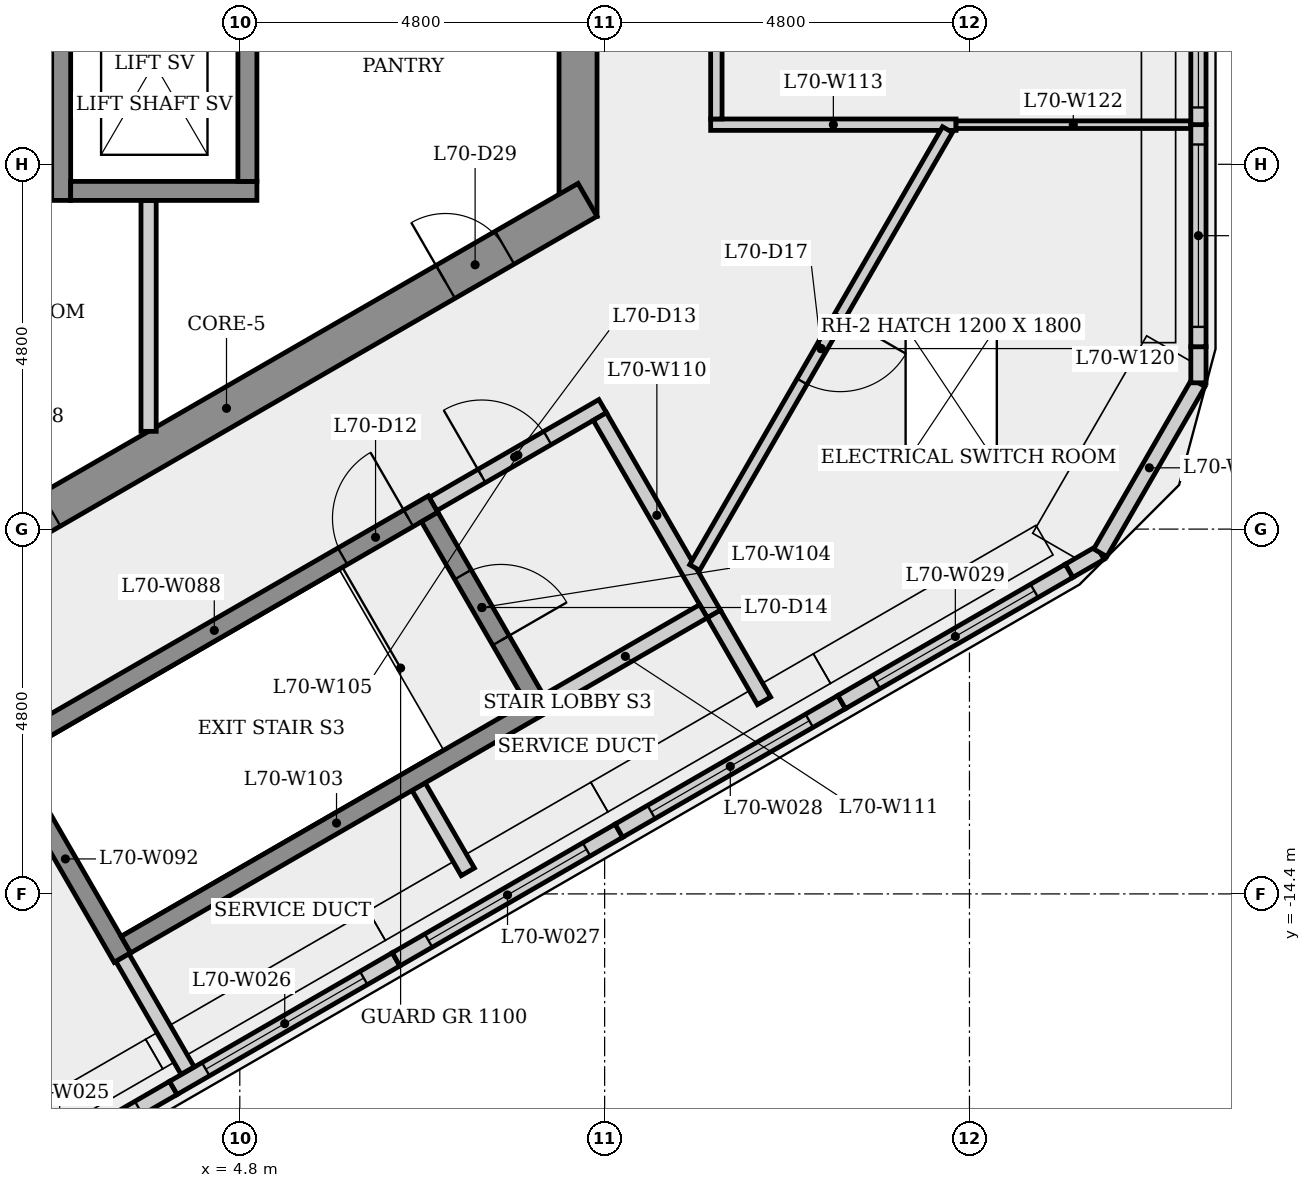
"""IFC4 building model, lengths in metres.
Left out: names, types, materials, properties, quantities, classifications, styles, units other than length and angle.
Written with IfcOpenShell. Run it as: python <this file> out.ifc"""

import sys

from ifc_helpers import new_model, si_unit, direction, frame, frame_2d, origin, origin_2d, place, context, subcontext, project, spatial, rectangle, extrude, element, fill, save


model = new_model("IFC4")
c1 = context("Model", 3, precision=1e-05, world=origin(), true_north=direction((0.0, 1.0)))
c2 = subcontext(c1, "Body", "Model", "MODEL_VIEW")
j1 = project(units=[si_unit("LENGTHUNIT", "METRE"), si_unit("PLANEANGLEUNIT", "RADIAN")], contexts=[c1])
p1 = place(None, origin())
s1 = spatial("IfcSite", under=j1, at=p1, CompositionType="ELEMENT")
p2 = place(p1, origin())
s2 = spatial("IfcBuilding", under=s1, at=p2, CompositionType="ELEMENT")
p3 = place(p2, frame((0.0, 0.0, 262.9)))
s3 = spatial("IfcBuildingStorey", under=s2, at=p3, CompositionType="ELEMENT", Elevation=262.9)
p4 = place(p3, frame((9.25, -5.485, 0.0), z_axis=(0.0, 0.0, 1.0), x_axis=(0.0, 1.0, 0.0)))
e1 = element("IfcWall", 1, at=p4, inside=s3, PredefinedType="SHEAR", context=c2, shape_type="SweptSolid", body=[
    extrude(rectangle(XDim=10.97, YDim=0.5, at=frame_2d((5.485, 0.0))), origin(), (0.0, 0.0, 1.0), 4.8),
])
p5 = place(p4, frame((4.685, 0.0, 0.0)))
e2 = element("IfcOpeningElement", 2, at=p5, cuts=e1, PredefinedType="OPENING", context=c2, shape_type="SweptSolid", body=[
    extrude(rectangle(XDim=1.6, YDim=2.1, at=frame_2d((0.8, 1.05))), frame((0.0, 0.26, 0.0), z_axis=(0.0, -1.0, 0.0), x_axis=(1.0, 0.0, 0.0)), (0.0, 0.0, 1.0), 0.52),
])
p6 = place(p3, frame((-0.125, -10.753, 0.0), z_axis=(0.0, 0.0, 1.0), x_axis=(0.866023993627, 0.500002442456, 0.0)))
e3 = element("IfcWall", 3, at=p6, inside=s3, PredefinedType="SHEAR", context=c2, shape_type="SweptSolid", body=[
    extrude(rectangle(XDim=10.97, YDim=0.5, at=frame_2d((5.485, 0.0))), origin(), (0.0, 0.0, 1.0), 4.8),
])
p7 = place(p6, frame((1.918, 0.0, 0.0)))
e4 = element("IfcOpeningElement", 4, at=p7, cuts=e3, PredefinedType="OPENING", context=c2, shape_type="SweptSolid", body=[
    extrude(rectangle(XDim=0.9, YDim=2.1, at=frame_2d((0.45, 1.05))), frame((0.0, 0.26, 0.0), z_axis=(0.0, -1.0, 0.0), x_axis=(1.0, 0.0, 0.0)), (0.0, 0.0, 1.0), 0.52),
])
p8 = place(p6, frame((8.812, 0.0, 0.0)))
e5 = element("IfcOpeningElement", 5, at=p8, cuts=e3, PredefinedType="OPENING", context=c2, shape_type="SweptSolid", body=[
    extrude(rectangle(XDim=0.9, YDim=2.1, at=frame_2d((0.45, 1.05))), frame((0.0, 0.26, 0.0), z_axis=(0.0, -1.0, 0.0), x_axis=(1.0, 0.0, 0.0)), (0.0, 0.0, 1.0), 0.52),
])
p9 = place(p3, frame((0.935, -18.68, 0.0), z_axis=(0.0, 0.0, 1.0), x_axis=(0.866046690806, 0.499963127985, 0.0)))
e6 = element("IfcWall", 6, at=p9, inside=s3, PredefinedType="SOLIDWALL", context=c2, shape_type="SweptSolid", body=[
    extrude(rectangle(XDim=3.454, YDim=0.2, at=frame_2d((1.727, 0.0))), origin(), (0.0, 0.0, 1.0), 4.8),
])
p10 = place(p9, frame((0.527, 0.0, 0.8)))
e7 = element("IfcOpeningElement", 7, at=p10, cuts=e6, PredefinedType="OPENING", context=c2, shape_type="SweptSolid", body=[
    extrude(rectangle(XDim=2.4, YDim=2.4, at=frame_2d((1.2, 1.2))), frame((0.0, 0.11, 0.0), z_axis=(0.0, -1.0, 0.0), x_axis=(1.0, 0.0, 0.0)), (0.0, 0.0, 1.0), 0.22),
])
p11 = place(p3, frame((3.926, -16.953, 0.0), z_axis=(0.0, 0.0, 1.0), x_axis=(0.866010178455, 0.500026370116, 0.0)))
e8 = element("IfcWall", 8, at=p11, inside=s3, PredefinedType="SOLIDWALL", context=c2, shape_type="SweptSolid", body=[
    extrude(rectangle(XDim=3.384, YDim=0.2, at=frame_2d((1.692, 0.0))), origin(), (0.0, 0.0, 1.0), 4.8),
])
p12 = place(p11, frame((0.492, 0.0, 0.8)))
e9 = element("IfcOpeningElement", 9, at=p12, cuts=e8, PredefinedType="OPENING", context=c2, shape_type="SweptSolid", body=[
    extrude(rectangle(XDim=2.4, YDim=2.4, at=frame_2d((1.2, 1.2))), frame((0.0, 0.11, 0.0), z_axis=(0.0, -1.0, 0.0), x_axis=(1.0, 0.0, 0.0)), (0.0, 0.0, 1.0), 0.22),
])
p13 = place(p3, frame((6.856, -15.261, 0.0), z_axis=(0.0, 0.0, 1.0), x_axis=(0.866051074803, 0.499955533855, 0.0)))
e10 = element("IfcWall", 10, at=p13, inside=s3, PredefinedType="SOLIDWALL", context=c2, shape_type="SweptSolid", body=[
    extrude(rectangle(XDim=3.385, YDim=0.2, at=frame_2d((1.692, 0.0))), origin(), (0.0, 0.0, 1.0), 4.8),
])
p14 = place(p13, frame((0.492, 0.0, 0.8)))
e11 = element("IfcOpeningElement", 11, at=p14, cuts=e10, PredefinedType="OPENING", context=c2, shape_type="SweptSolid", body=[
    extrude(rectangle(XDim=2.4, YDim=2.4, at=frame_2d((1.2, 1.2))), frame((0.0, 0.11, 0.0), z_axis=(0.0, -1.0, 0.0), x_axis=(1.0, 0.0, 0.0)), (0.0, 0.0, 1.0), 0.22),
])
p15 = place(p3, frame((9.788, -13.568, 0.0), z_axis=(0.0, 0.0, 1.0), x_axis=(0.865992138996, 0.500057611879, 0.0)))
e12 = element("IfcWall", 12, at=p15, inside=s3, PredefinedType="SOLIDWALL", context=c2, shape_type="SweptSolid", body=[
    extrude(rectangle(XDim=3.384, YDim=0.2, at=frame_2d((1.692, 0.0))), origin(), (0.0, 0.0, 1.0), 4.8),
])
p16 = place(p15, frame((0.492, 0.0, 0.8)))
e13 = element("IfcOpeningElement", 13, at=p16, cuts=e12, PredefinedType="OPENING", context=c2, shape_type="SweptSolid", body=[
    extrude(rectangle(XDim=2.4, YDim=2.4, at=frame_2d((1.2, 1.2))), frame((0.0, 0.11, 0.0), z_axis=(0.0, -1.0, 0.0), x_axis=(1.0, 0.0, 0.0)), (0.0, 0.0, 1.0), 0.22),
])
p17 = place(p3, frame((12.719, -11.876, 0.0), z_axis=(0.0, 0.0, 1.0), x_axis=(0.866064358114, 0.499932523051, 0.0)))
e14 = element("IfcWall", 14, at=p17, inside=s3, PredefinedType="SOLIDWALL", context=c2, shape_type="SweptSolid", body=[
    extrude(rectangle(XDim=3.454, YDim=0.2, at=frame_2d((1.727, 0.0))), origin(), (0.0, 0.0, 1.0), 4.8),
])
p18 = place(p17, frame((0.527, 0.0, 0.8)))
e15 = element("IfcOpeningElement", 15, at=p18, cuts=e14, PredefinedType="OPENING", context=c2, shape_type="SweptSolid", body=[
    extrude(rectangle(XDim=2.4, YDim=2.4, at=frame_2d((1.2, 1.2))), frame((0.0, 0.11, 0.0), z_axis=(0.0, -1.0, 0.0), x_axis=(1.0, 0.0, 0.0)), (0.0, 0.0, 1.0), 0.22),
])
p19 = place(p3, frame((15.71, -10.149, 0.0), z_axis=(0.0, 0.0, 1.0), x_axis=(0.865860123781, 0.500286164156, 0.0)))
e16 = element("IfcWall", 16, at=p19, inside=s3, PredefinedType="SOLIDWALL", context=c2, shape_type="SweptSolid", body=[
    extrude(rectangle(XDim=0.475, YDim=0.2, at=frame_2d((0.237, 0.0))), origin(), (0.0, 0.0, 1.0), 4.8),
])
p20 = place(p3, frame((16.121, -9.912, 0.0), z_axis=(0.0, 0.0, 1.0), x_axis=(0.500063394028, 0.865988800131, 0.0)))
e17 = element("IfcWall", 17, at=p20, inside=s3, PredefinedType="SOLIDWALL", context=c2, shape_type="SweptSolid", body=[
    extrude(rectangle(XDim=2.583, YDim=0.2, at=frame_2d((1.292, 0.0))), origin(), (0.0, 0.0, 1.0), 4.8),
])
p21 = place(p3, frame((17.413, -7.675, 0.0), z_axis=(0.0, 0.0, 1.0), x_axis=(0.0, 1.0, 0.0)))
e18 = element("IfcWall", 18, at=p21, inside=s3, PredefinedType="SOLIDWALL", context=c2, shape_type="SweptSolid", body=[
    extrude(rectangle(XDim=0.475, YDim=0.2, at=frame_2d((0.238, 0.0))), origin(), (0.0, 0.0, 1.0), 4.8),
])
p22 = place(p3, frame((17.413, -7.2, 0.0), z_axis=(0.0, 0.0, 1.0), x_axis=(0.0, 1.0, 0.0)))
e19 = element("IfcWall", 19, at=p22, inside=s3, PredefinedType="SOLIDWALL", context=c2, shape_type="SweptSolid", body=[
    extrude(rectangle(XDim=2.922, YDim=0.2, at=frame_2d((1.461, 0.0))), origin(), (0.0, 0.0, 1.0), 4.8),
])
p23 = place(p22, frame((0.261, 0.0, 0.8)))
e20 = element("IfcOpeningElement", 20, at=p23, cuts=e19, PredefinedType="OPENING", context=c2, shape_type="SweptSolid", body=[
    extrude(rectangle(XDim=2.4, YDim=2.4, at=frame_2d((1.2, 1.2))), frame((0.0, 0.11, 0.0), z_axis=(0.0, -1.0, 0.0), x_axis=(1.0, 0.0, 0.0)), (0.0, 0.0, 1.0), 0.22),
])
p24 = place(p3, frame((17.413, -4.278, 0.0), z_axis=(0.0, 0.0, 1.0), x_axis=(0.0, 1.0, 0.0)))
e21 = element("IfcWall", 21, at=p24, inside=s3, PredefinedType="SOLIDWALL", context=c2, shape_type="SweptSolid", body=[
    extrude(rectangle(XDim=2.852, YDim=0.2, at=frame_2d((1.426, 0.0))), origin(), (0.0, 0.0, 1.0), 4.8),
])
p25 = place(p24, frame((0.226, 0.0, 0.8)))
e22 = element("IfcOpeningElement", 22, at=p25, cuts=e21, PredefinedType="OPENING", context=c2, shape_type="SweptSolid", body=[
    extrude(rectangle(XDim=2.4, YDim=2.4, at=frame_2d((1.2, 1.2))), frame((0.0, 0.11, 0.0), z_axis=(0.0, -1.0, 0.0), x_axis=(1.0, 0.0, 0.0)), (0.0, 0.0, 1.0), 0.22),
])
p26 = place(p3, frame((1.585, -12.595, 0.0), z_axis=(0.0, 0.0, 1.0), x_axis=(0.866036417653, 0.499980922934, 0.0)))
e23 = element("IfcWall", 23, at=p26, inside=s3, PredefinedType="SHEAR", context=c2, shape_type="SweptSolid", body=[
    extrude(rectangle(XDim=6.65, YDim=0.25, at=frame_2d((3.325, 0.0))), origin(), (0.0, 0.0, 1.0), 4.5),
])
p27 = place(p26, frame((5.275, 0.0, 0.0)))
e24 = element("IfcOpeningElement", 24, at=p27, cuts=e23, PredefinedType="OPENING", context=c2, shape_type="SweptSolid", body=[
    extrude(rectangle(XDim=1.0, YDim=2.1, at=frame_2d((0.5, 1.05))), frame((0.0, 0.135, 0.0), z_axis=(0.0, -1.0, 0.0), x_axis=(1.0, 0.0, 0.0)), (0.0, 0.0, 1.0), 0.27),
])
p28 = place(p3, frame((2.45, -5.275, 0.0), z_axis=(0.0, 0.0, 1.0), x_axis=(0.0, 1.0, 0.0)))
e25 = element("IfcWall", 25, at=p28, inside=s3, PredefinedType="SHEAR", context=c2, shape_type="SweptSolid", body=[
    extrude(rectangle(XDim=3.6, YDim=0.25, at=frame_2d((1.8, 0.0))), origin(), (0.0, 0.0, 1.0), 4.5),
])
p29 = place(p3, frame((3.256, -15.239, 0.0), z_axis=(0.0, 0.0, 1.0), x_axis=(-0.50002537861, 0.866010750942, 0.0)))
e26 = element("IfcWall", 26, at=p29, inside=s3, PredefinedType="SHEAR", context=c2, shape_type="SweptSolid", body=[
    extrude(rectangle(XDim=3.0, YDim=0.25, at=frame_2d((1.5, 0.0))), origin(), (0.0, 0.0, 1.0), 4.5),
])
p30 = place(p3, frame((3.6, -5.275, 0.0), z_axis=(0.0, 0.0, 1.0), x_axis=(0.0, -1.0, 0.0)))
e27 = element("IfcWall", 27, at=p30, inside=s3, PredefinedType="PARTITIONING", context=c2, shape_type="SweptSolid", body=[
    extrude(rectangle(XDim=3.039, YDim=0.2, at=frame_2d((1.52, 0.0))), origin(), (0.0, 0.0, 1.0), 4.5),
])
p31 = place(p3, frame((2.575, -5.15, 0.0), z_axis=(0.0, 0.0, 1.0), x_axis=(1.0, 0.0, 0.0)))
e28 = element("IfcWall", 28, at=p31, inside=s3, PredefinedType="SHEAR", context=c2, shape_type="SweptSolid", body=[
    extrude(rectangle(XDim=2.45, YDim=0.25, at=frame_2d((1.225, 0.0))), origin(), (0.0, 0.0, 1.0), 4.5),
])
p32 = place(p3, frame((4.113, -16.725, 0.0), z_axis=(0.0, 0.0, 1.0), x_axis=(-0.499919551962, 0.866071845499, 0.0)))
e29 = element("IfcWall", 29, at=p32, inside=s3, PredefinedType="PLUMBINGWALL", context=c2, shape_type="SweptSolid", body=[
    extrude(rectangle(XDim=1.716, YDim=0.2, at=frame_2d((0.858, 0.0))), origin(), (0.0, 0.0, 1.0), 4.5),
])
p33 = place(p3, frame((4.9, -1.675, 0.0), z_axis=(0.0, 0.0, 1.0), x_axis=(0.0, -1.0, 0.0)))
e30 = element("IfcWall", 30, at=p33, inside=s3, PredefinedType="SHEAR", context=c2, shape_type="SweptSolid", body=[
    extrude(rectangle(XDim=3.35, YDim=0.25, at=frame_2d((1.675, 0.0))), origin(), (0.0, 0.0, 1.0), 4.5),
])
p34 = place(p3, frame((7.153, -12.989, 0.0), z_axis=(0.0, 0.0, 1.0), x_axis=(0.499972779981, -0.866041118699, 0.0)))
e31 = element("IfcWall", 31, at=p34, inside=s3, PredefinedType="PLUMBINGWALL", context=c2, shape_type="SweptSolid", body=[
    extrude(rectangle(XDim=1.294, YDim=0.2, at=frame_2d((0.647, 0.0))), origin(), (0.0, 0.0, 1.0), 4.5),
])
p35 = place(p3, frame((3.301, -15.068, 0.0), z_axis=(0.0, 0.0, 1.0), x_axis=(0.866035036182, 0.499983315828, 0.0)))
e32 = element("IfcWall", 32, at=p35, inside=s3, PredefinedType="SHEAR", context=c2, shape_type="SweptSolid", body=[
    extrude(rectangle(XDim=6.4, YDim=0.25, at=frame_2d((3.2, 0.0))), origin(), (0.0, 0.0, 1.0), 4.5),
])
p36 = place(p3, frame((7.298, -9.441, 0.0), z_axis=(0.0, 0.0, 1.0), x_axis=(0.500034990121, -0.866005201286, 0.0)))
e33 = element("IfcWall", 33, at=p36, inside=s3, PredefinedType="SHEAR", context=c2, shape_type="SweptSolid", body=[
    extrude(rectangle(XDim=2.75, YDim=0.25, at=frame_2d((1.375, 0.0))), origin(), (0.0, 0.0, 1.0), 4.5),
])
p37 = place(p36, frame((0.875, 0.0, 0.0)))
e34 = element("IfcOpeningElement", 34, at=p37, cuts=e33, PredefinedType="OPENING", context=c2, shape_type="SweptSolid", body=[
    extrude(rectangle(XDim=1.0, YDim=2.1, at=frame_2d((0.5, 1.05))), frame((0.0, 0.135, 0.0), z_axis=(0.0, -1.0, 0.0), x_axis=(1.0, 0.0, 0.0)), (0.0, 0.0, 1.0), 0.27),
])
p38 = place(p3, frame((7.344, -9.27, 0.0), z_axis=(0.0, 0.0, 1.0), x_axis=(0.866005588531, 0.500034319456, 0.0)))
e35 = element("IfcWall", 35, at=p38, inside=s3, PredefinedType="PARTITIONING", context=c2, shape_type="SweptSolid", body=[
    extrude(rectangle(XDim=2.575, YDim=0.2, at=frame_2d((1.288, 0.0))), origin(), (0.0, 0.0, 1.0), 4.5),
])
p39 = place(p38, frame((0.738, 0.0, 0.0)))
e36 = element("IfcOpeningElement", 36, at=p39, cuts=e35, PredefinedType="OPENING", context=c2, shape_type="SweptSolid", body=[
    extrude(rectangle(XDim=1.0, YDim=2.1, at=frame_2d((0.5, 1.05))), frame((0.0, 0.11, 0.0), z_axis=(0.0, -1.0, 0.0), x_axis=(1.0, 0.0, 0.0)), (0.0, 0.0, 1.0), 0.22),
])
p40 = place(p3, frame((9.537, -8.119, 0.0), z_axis=(0.0, 0.0, 1.0), x_axis=(0.499990139034, -0.866031096941, 0.0)))
e37 = element("IfcWall", 37, at=p40, inside=s3, PredefinedType="PARTITIONING", context=c2, shape_type="SweptSolid", body=[
    extrude(rectangle(XDim=3.0, YDim=0.2, at=frame_2d((1.5, 0.0))), origin(), (0.0, 0.0, 1.0), 4.5),
])
p41 = place(p3, frame((10.901, -10.681, 0.0), z_axis=(0.0, 0.0, 1.0), x_axis=(-0.866007538022, -0.500030943131, 0.0)))
e38 = element("IfcWall", 38, at=p41, inside=s3, PredefinedType="PLUMBINGWALL", context=c2, shape_type="SweptSolid", body=[
    extrude(rectangle(XDim=2.375, YDim=0.2, at=frame_2d((1.188, 0.0))), origin(), (0.0, 0.0, 1.0), 4.5),
])
p42 = place(p3, frame((11.037, -10.717, 0.0), z_axis=(0.0, 0.0, 1.0), x_axis=(0.500000102728, -0.866025344474, 0.0)))
e39 = element("IfcWall", 39, at=p42, inside=s3, PredefinedType="PLUMBINGWALL", context=c2, shape_type="SweptSolid", body=[
    extrude(rectangle(XDim=1.319, YDim=0.2, at=frame_2d((0.66, 0.0))), origin(), (0.0, 0.0, 1.0), 4.5),
])
p43 = place(p3, frame((10.995, -4.279, 0.0), z_axis=(0.0, 0.0, 1.0), x_axis=(1.0, 0.0, 0.0)))
e40 = element("IfcWall", 40, at=p43, inside=s3, PredefinedType="PARTITIONING", context=c2, shape_type="SweptSolid", body=[
    extrude(rectangle(XDim=3.229, YDim=0.15, at=frame_2d((1.614, 0.0))), origin(), (0.0, 0.0, 1.0), 4.5),
])
p44 = place(p3, frame((11.07, 4.354, 0.0), z_axis=(0.0, 0.0, 1.0), x_axis=(0.0, -1.0, 0.0)))
e41 = element("IfcWall", 41, at=p44, inside=s3, PredefinedType="PARTITIONING", context=c2, shape_type="SweptSolid", body=[
    extrude(rectangle(XDim=8.557, YDim=0.15, at=frame_2d((4.279, 0.0))), origin(), (0.0, 0.0, 1.0), 4.5),
])
p45 = place(p44, frame((2.426, 0.0, 0.0)))
e42 = element("IfcOpeningElement", 42, at=p45, cuts=e41, PredefinedType="OPENING", context=c2, shape_type="SweptSolid", body=[
    extrude(rectangle(XDim=1.0, YDim=2.1, at=frame_2d((0.5, 1.05))), frame((0.0, 0.085, 0.0), z_axis=(0.0, -1.0, 0.0), x_axis=(1.0, 0.0, 0.0)), (0.0, 0.0, 1.0), 0.17),
])
p46 = place(p3, frame((14.111, -4.344, 0.0), z_axis=(0.0, 0.0, 1.0), x_axis=(-0.499967020646, -0.866044443586, 0.0)))
e43 = element("IfcWall", 43, at=p46, inside=s3, PredefinedType="PARTITIONING", context=c2, shape_type="SweptSolid", body=[
    extrude(rectangle(XDim=6.654, YDim=0.15, at=frame_2d((3.327, 0.0))), origin(), (0.0, 0.0, 1.0), 4.5),
])
p47 = place(p46, frame((2.827, 0.0, 0.0)))
e44 = element("IfcOpeningElement", 44, at=p47, cuts=e43, PredefinedType="OPENING", context=c2, shape_type="SweptSolid", body=[
    extrude(rectangle(XDim=1.0, YDim=2.1, at=frame_2d((0.5, 1.05))), frame((0.0, 0.085, 0.0), z_axis=(0.0, -1.0, 0.0), x_axis=(1.0, 0.0, 0.0)), (0.0, 0.0, 1.0), 0.17),
])
p48 = place(p3, frame((17.309, -4.279, 0.0), z_axis=(0.0, 0.0, 1.0), x_axis=(-1.0, 0.0, 0.0)))
e45 = element("IfcWall", 45, at=p48, inside=s3, PredefinedType="PARTITIONING", context=c2, shape_type="SweptSolid", body=[
    extrude(rectangle(XDim=3.085, YDim=0.1, at=frame_2d((1.542, 0.0))), origin(), (0.0, 0.0, 1.0), 4.5),
])
p49 = place(p10, origin())
e46 = element("IfcWindow", 46, at=p49, inside=s3, PartitioningType="SINGLE_PANEL", PredefinedType="WINDOW", context=c2, shape_type="SweptSolid", body=[
    extrude(rectangle(XDim=2.4, YDim=2.4, at=frame_2d((1.2, 1.2))), frame((0.0, 0.03, 0.0), z_axis=(0.0, -1.0, 0.0), x_axis=(1.0, 0.0, 0.0)), (0.0, 0.0, 1.0), 0.06),
])
fill(e7, e46)
p50 = place(p12, origin())
e47 = element("IfcWindow", 47, at=p50, inside=s3, PartitioningType="SINGLE_PANEL", PredefinedType="WINDOW", context=c2, shape_type="SweptSolid", body=[
    extrude(rectangle(XDim=2.4, YDim=2.4, at=frame_2d((1.2, 1.2))), frame((0.0, 0.03, 0.0), z_axis=(0.0, -1.0, 0.0), x_axis=(1.0, 0.0, 0.0)), (0.0, 0.0, 1.0), 0.06),
])
fill(e9, e47)
p51 = place(p14, origin())
e48 = element("IfcWindow", 48, at=p51, inside=s3, PartitioningType="SINGLE_PANEL", PredefinedType="WINDOW", context=c2, shape_type="SweptSolid", body=[
    extrude(rectangle(XDim=2.4, YDim=2.4, at=frame_2d((1.2, 1.2))), frame((0.0, 0.03, 0.0), z_axis=(0.0, -1.0, 0.0), x_axis=(1.0, 0.0, 0.0)), (0.0, 0.0, 1.0), 0.06),
])
fill(e11, e48)
p52 = place(p16, origin())
e49 = element("IfcWindow", 49, at=p52, inside=s3, PartitioningType="SINGLE_PANEL", PredefinedType="WINDOW", context=c2, shape_type="SweptSolid", body=[
    extrude(rectangle(XDim=2.4, YDim=2.4, at=frame_2d((1.2, 1.2))), frame((0.0, 0.03, 0.0), z_axis=(0.0, -1.0, 0.0), x_axis=(1.0, 0.0, 0.0)), (0.0, 0.0, 1.0), 0.06),
])
fill(e13, e49)
p53 = place(p18, origin())
e50 = element("IfcWindow", 50, at=p53, inside=s3, PartitioningType="SINGLE_PANEL", PredefinedType="WINDOW", context=c2, shape_type="SweptSolid", body=[
    extrude(rectangle(XDim=2.4, YDim=2.4, at=frame_2d((1.2, 1.2))), frame((0.0, 0.03, 0.0), z_axis=(0.0, -1.0, 0.0), x_axis=(1.0, 0.0, 0.0)), (0.0, 0.0, 1.0), 0.06),
])
fill(e15, e50)
p54 = place(p23, origin())
e51 = element("IfcWindow", 51, at=p54, inside=s3, PartitioningType="SINGLE_PANEL", PredefinedType="WINDOW", context=c2, shape_type="SweptSolid", body=[
    extrude(rectangle(XDim=2.4, YDim=2.4, at=frame_2d((1.2, 1.2))), frame((0.0, 0.03, 0.0), z_axis=(0.0, -1.0, 0.0), x_axis=(1.0, 0.0, 0.0)), (0.0, 0.0, 1.0), 0.06),
])
fill(e20, e51)
p55 = place(p25, origin())
e52 = element("IfcWindow", 52, at=p55, inside=s3, PartitioningType="SINGLE_PANEL", PredefinedType="WINDOW", context=c2, shape_type="SweptSolid", body=[
    extrude(rectangle(XDim=2.4, YDim=2.4, at=frame_2d((1.2, 1.2))), frame((0.0, 0.03, 0.0), z_axis=(0.0, -1.0, 0.0), x_axis=(1.0, 0.0, 0.0)), (0.0, 0.0, 1.0), 0.06),
])
fill(e22, e52)
p56 = place(p2, frame((0.0, 0.0, 267.7)))
p57 = place(p56, origin())
p58 = place(p57, frame((14.16, -7.835, -0.01)))
p59 = place(p58, frame((0.0, 0.0, 0.26)))
e53 = element("IfcWindow", 53, at=p59, inside=s3, PartitioningType="SINGLE_PANEL", PredefinedType="SKYLIGHT", context=c2, shape_type="SweptSolid", body=[
    extrude(rectangle(XDim=1.8, YDim=1.2, at=origin_2d()), origin(), (0.0, 0.0, 1.0), 0.05),
])
p60 = place(p27, origin())
e54 = element("IfcDoor", 54, at=p60, inside=s3, OperationType="SINGLE_SWING_RIGHT", PredefinedType="DOOR", context=c2, shape_type="SweptSolid", body=[
    extrude(rectangle(XDim=1.0, YDim=2.1, at=frame_2d((0.5, 1.05))), frame((0.0, 0.025, 0.0), z_axis=(0.0, -1.0, 0.0), x_axis=(1.0, 0.0, 0.0)), (0.0, 0.0, 1.0), 0.05),
])
fill(e24, e54)
p61 = place(p39, origin())
e55 = element("IfcDoor", 55, at=p61, inside=s3, OperationType="SINGLE_SWING_LEFT", PredefinedType="DOOR", context=c2, shape_type="SweptSolid", body=[
    extrude(rectangle(XDim=1.0, YDim=2.1, at=frame_2d((0.5, 1.05))), frame((0.0, 0.025, 0.0), z_axis=(0.0, -1.0, 0.0), x_axis=(1.0, 0.0, 0.0)), (0.0, 0.0, 1.0), 0.05),
])
fill(e36, e55)
p62 = place(p37, origin())
e56 = element("IfcDoor", 56, at=p62, inside=s3, OperationType="SINGLE_SWING_RIGHT", PredefinedType="DOOR", context=c2, shape_type="SweptSolid", body=[
    extrude(rectangle(XDim=1.0, YDim=2.1, at=frame_2d((0.5, 1.05))), frame((0.0, 0.025, 0.0), z_axis=(0.0, -1.0, 0.0), x_axis=(1.0, 0.0, 0.0)), (0.0, 0.0, 1.0), 0.05),
])
fill(e34, e56)
p63 = place(p47, origin())
e57 = element("IfcDoor", 57, at=p63, inside=s3, OperationType="SINGLE_SWING_LEFT", PredefinedType="DOOR", context=c2, shape_type="SweptSolid", body=[
    extrude(rectangle(XDim=1.0, YDim=2.1, at=frame_2d((0.5, 1.05))), frame((0.0, 0.025, 0.0), z_axis=(0.0, -1.0, 0.0), x_axis=(1.0, 0.0, 0.0)), (0.0, 0.0, 1.0), 0.05),
])
fill(e44, e57)
p64 = place(p8, origin())
e58 = element("IfcDoor", 58, at=p64, inside=s3, OperationType="SINGLE_SWING_LEFT", PredefinedType="DOOR", context=c2, shape_type="SweptSolid", body=[
    extrude(rectangle(XDim=0.9, YDim=2.1, at=frame_2d((0.45, 1.05))), frame((0.0, 0.025, 0.0), z_axis=(0.0, -1.0, 0.0), x_axis=(1.0, 0.0, 0.0)), (0.0, 0.0, 1.0), 0.05),
])
fill(e5, e58)
save(model, sys.argv[1])
